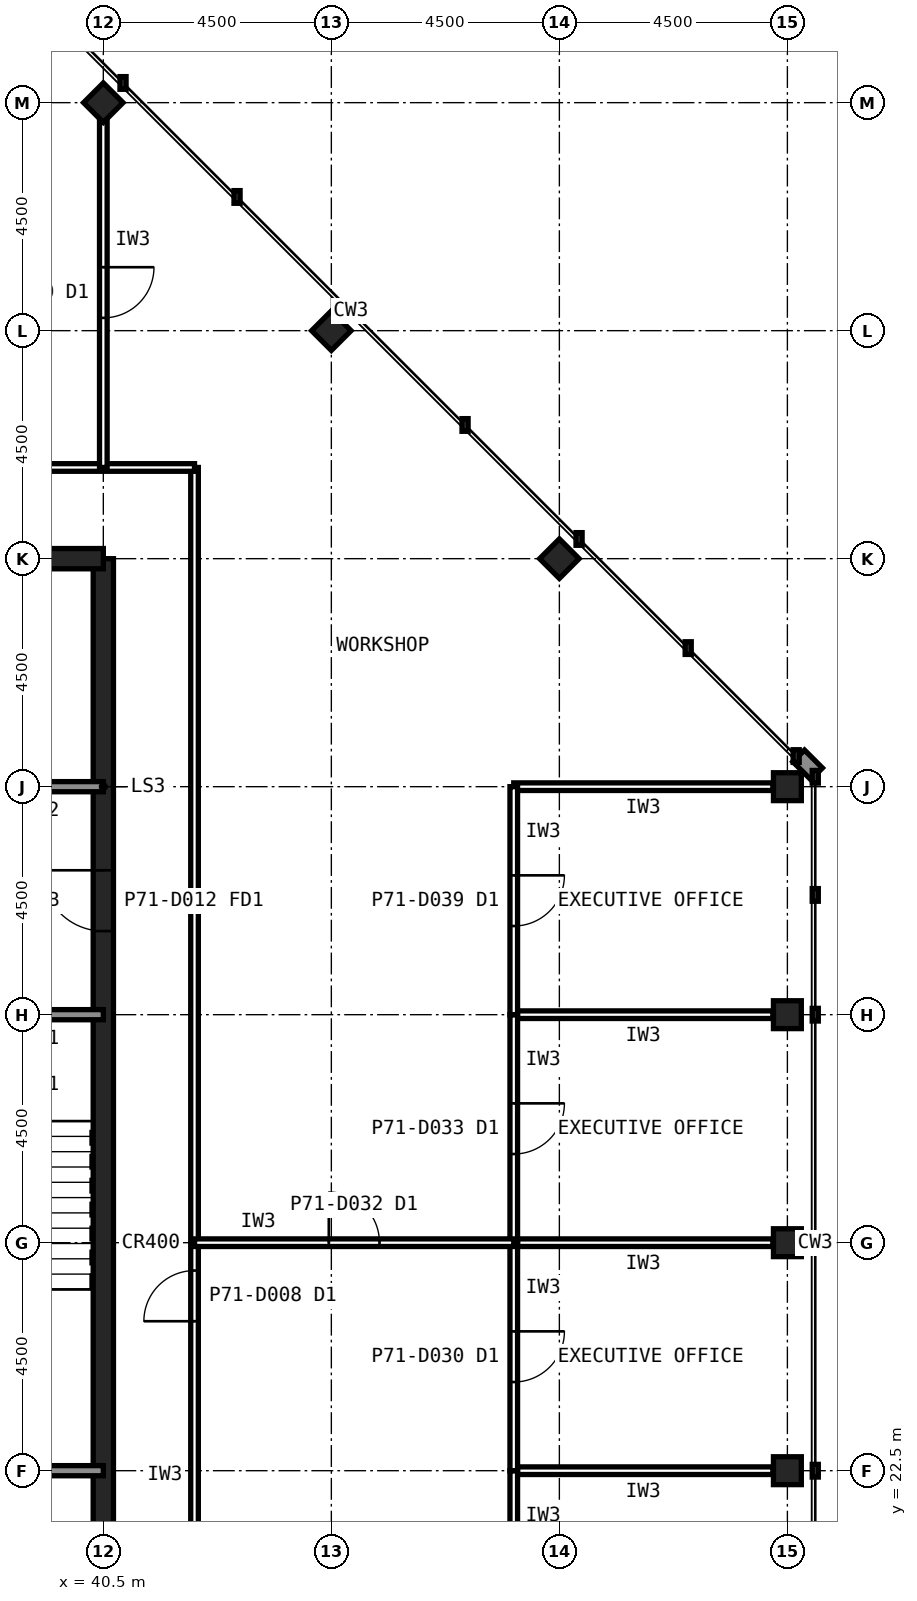
"""IFC4 building model, lengths in metres.
Left out: names, types, materials, properties, quantities, classifications, styles, units other than length and angle.
Written with IfcOpenShell. Run it as: python <this file> out.ifc"""

import sys

from ifc_helpers import new_model, si_unit, direction, frame, frame_2d, origin, origin_2d, place, context, subcontext, project, spatial, rectangle, hollow_rectangle, extrude, element, fill, save


model = new_model("IFC4")
c1 = context("Model", 3, precision=1e-05, world=origin(), true_north=direction((0.0, 1.0)))
c2 = subcontext(c1, "Body", "Model", "MODEL_VIEW")
j1 = project(units=[si_unit("LENGTHUNIT", "METRE"), si_unit("PLANEANGLEUNIT", "RADIAN")], contexts=[c1])
p1 = place(None, origin())
s1 = spatial("IfcSite", under=j1, at=p1, CompositionType="ELEMENT")
p2 = place(p1, origin())
s2 = spatial("IfcBuilding", under=s1, at=p2, CompositionType="ELEMENT")
p3 = place(p2, frame((0.0, 0.0, 294.6)))
s3 = spatial("IfcBuildingStorey", under=s2, at=p3, CompositionType="ELEMENT", Elevation=294.6)
for number, where, z_axis, x_axis in (
    (1, (54.0, 22.5, 0.0), (0.0, 0.0, 1.0), (1.0, 0.0, 0.0)),
    (2, (54.0, 27.0, 0.0), (0.0, 0.0, 1.0), (1.0, 0.0, 0.0)),
    (3, (54.0, 31.5, 0.0), (0.0, 0.0, 1.0), (1.0, 0.0, 0.0)),
    (4, (54.0, 36.0, 0.0), (0.0, 0.0, 1.0), (1.0, 0.0, 0.0)),
    (5, (49.5, 40.5, 0.0), (0.0, 0.0, 1.0), (0.707, 0.707, 0.0)),
    (6, (45.0, 45.0, 0.0), (0.0, 0.0, 1.0), (0.707, 0.707, 0.0)),
    (7, (40.5, 49.5, 0.0), (0.0, 0.0, 1.0), (0.707, 0.707, 0.0)),
):
    element("IfcColumn", number, at=place(p3, frame(where, z_axis=z_axis, x_axis=x_axis)), inside=s3, PredefinedType="COLUMN", context=c2, shape_type="SweptSolid", body=[
        extrude(hollow_rectangle(XDim=0.55, YDim=0.55, WallThickness=0.025, at=origin_2d()), origin(), (0.0, 0.0, 1.0), 4.0),
    ])
p4 = place(p3, frame((40.5, 13.5, 0.0), z_axis=(0.0, 0.0, 1.0), x_axis=(0.0, 1.0, 0.0)))
e8 = element("IfcWall", 8, at=p4, inside=s3, PredefinedType="SHEAR", context=c2, shape_type="SweptSolid", body=[
    extrude(rectangle(XDim=27.0, YDim=0.4, at=frame_2d((13.5, 0.0))), origin(), (0.0, 0.0, 1.0), 4.0),
])
p5 = place(p4, frame((5.85, 0.0, 0.0)))
e9 = element("IfcOpeningElement", 9, at=p5, cuts=e8, PredefinedType="OPENING", context=c2, shape_type="SweptSolid", body=[
    extrude(rectangle(XDim=1.8, YDim=2.1, at=frame_2d((0.9, 1.05))), frame((0.0, 0.21, 0.0), z_axis=(0.0, -1.0, 0.0), x_axis=(1.0, 0.0, 0.0)), (0.0, 0.0, 1.0), 0.42),
])
p6 = place(p4, frame((19.65, 0.0, 0.0)))
e10 = element("IfcOpeningElement", 10, at=p6, cuts=e8, PredefinedType="OPENING", context=c2, shape_type="SweptSolid", body=[
    extrude(rectangle(XDim=1.2, YDim=2.1, at=frame_2d((0.6, 1.05))), frame((0.0, 0.21, 0.0), z_axis=(0.0, -1.0, 0.0), x_axis=(1.0, 0.0, 0.0)), (0.0, 0.0, 1.0), 0.42),
])
p7 = place(p3, frame((40.5, 40.5, 0.0), z_axis=(0.0, 0.0, 1.0), x_axis=(-1.0, 0.0, 0.0)))
e11 = element("IfcWall", 11, at=p7, inside=s3, PredefinedType="SHEAR", context=c2, shape_type="SweptSolid", body=[
    extrude(rectangle(XDim=27.0, YDim=0.4, at=frame_2d((13.5, 0.0))), origin(), (0.0, 0.0, 1.0), 4.0),
])
p8 = place(p3, frame((13.5, 36.0, 0.0), z_axis=(0.0, 0.0, 1.0), x_axis=(1.0, 0.0, 0.0)))
e12 = element("IfcWall", 12, at=p8, inside=s3, PredefinedType="SOLIDWALL", context=c2, shape_type="SweptSolid", body=[
    extrude(rectangle(XDim=27.0, YDim=0.2, at=frame_2d((13.5, 0.0))), origin(), (0.0, 0.0, 1.0), 3.84),
])
p9 = place(p8, frame((1.8, 0.0, 0.0)))
e13 = element("IfcOpeningElement", 13, at=p9, cuts=e12, PredefinedType="OPENING", context=c2, shape_type="SweptSolid", body=[
    extrude(rectangle(XDim=0.9, YDim=2.1, at=frame_2d((0.45, 1.05))), frame((0.0, 0.11, 0.0), z_axis=(0.0, -1.0, 0.0), x_axis=(1.0, 0.0, 0.0)), (0.0, 0.0, 1.0), 0.22),
])
p10 = place(p8, frame((5.55, 0.0, 0.0)))
e14 = element("IfcOpeningElement", 14, at=p10, cuts=e12, PredefinedType="OPENING", context=c2, shape_type="SweptSolid", body=[
    extrude(rectangle(XDim=0.9, YDim=2.1, at=frame_2d((0.45, 1.05))), frame((0.0, 0.11, 0.0), z_axis=(0.0, -1.0, 0.0), x_axis=(1.0, 0.0, 0.0)), (0.0, 0.0, 1.0), 0.22),
])
p11 = place(p8, frame((11.55, 0.0, 0.0)))
e15 = element("IfcOpeningElement", 15, at=p11, cuts=e12, PredefinedType="OPENING", context=c2, shape_type="SweptSolid", body=[
    extrude(rectangle(XDim=0.9, YDim=2.1, at=frame_2d((0.45, 1.05))), frame((0.0, 0.11, 0.0), z_axis=(0.0, -1.0, 0.0), x_axis=(1.0, 0.0, 0.0)), (0.0, 0.0, 1.0), 0.22),
])
p12 = place(p8, frame((14.55, 0.0, 0.0)))
e16 = element("IfcOpeningElement", 16, at=p12, cuts=e12, PredefinedType="OPENING", context=c2, shape_type="SweptSolid", body=[
    extrude(rectangle(XDim=0.9, YDim=2.1, at=frame_2d((0.45, 1.05))), frame((0.0, 0.11, 0.0), z_axis=(0.0, -1.0, 0.0), x_axis=(1.0, 0.0, 0.0)), (0.0, 0.0, 1.0), 0.22),
])
p13 = place(p8, frame((24.1, 0.0, 0.0)))
e17 = element("IfcOpeningElement", 17, at=p13, cuts=e12, PredefinedType="OPENING", context=c2, shape_type="SweptSolid", body=[
    extrude(rectangle(XDim=1.3, YDim=2.2, at=frame_2d((0.65, 1.1))), frame((0.0, 0.11, 0.0), z_axis=(0.0, -1.0, 0.0), x_axis=(1.0, 0.0, 0.0)), (0.0, 0.0, 1.0), 0.22),
])
p14 = place(p3, frame((13.5, 22.5, 0.0), z_axis=(0.0, 0.0, 1.0), x_axis=(1.0, 0.0, 0.0)))
e18 = element("IfcWall", 18, at=p14, inside=s3, PredefinedType="SOLIDWALL", context=c2, shape_type="SweptSolid", body=[
    extrude(rectangle(XDim=27.0, YDim=0.2, at=frame_2d((13.5, 0.0))), origin(), (0.0, 0.0, 1.0), 3.84),
])
p15 = place(p14, frame((1.65, 0.0, 0.0)))
e19 = element("IfcOpeningElement", 19, at=p15, cuts=e18, PredefinedType="OPENING", context=c2, shape_type="SweptSolid", body=[
    extrude(rectangle(XDim=1.2, YDim=2.1, at=frame_2d((0.6, 1.05))), frame((0.0, 0.11, 0.0), z_axis=(0.0, -1.0, 0.0), x_axis=(1.0, 0.0, 0.0)), (0.0, 0.0, 1.0), 0.22),
])
p16 = place(p14, frame((6.025, 0.0, 0.0)))
e20 = element("IfcOpeningElement", 20, at=p16, cuts=e18, PredefinedType="OPENING", context=c2, shape_type="SweptSolid", body=[
    extrude(rectangle(XDim=1.0, YDim=2.1, at=frame_2d((0.5, 1.05))), frame((0.0, 0.11, 0.0), z_axis=(0.0, -1.0, 0.0), x_axis=(1.0, 0.0, 0.0)), (0.0, 0.0, 1.0), 0.22),
])
p17 = place(p14, frame((10.525, 0.0, 0.0)))
e21 = element("IfcOpeningElement", 21, at=p17, cuts=e18, PredefinedType="OPENING", context=c2, shape_type="SweptSolid", body=[
    extrude(rectangle(XDim=1.0, YDim=2.1, at=frame_2d((0.5, 1.05))), frame((0.0, 0.11, 0.0), z_axis=(0.0, -1.0, 0.0), x_axis=(1.0, 0.0, 0.0)), (0.0, 0.0, 1.0), 0.22),
])
p18 = place(p14, frame((19.75, 0.0, 0.0)))
e22 = element("IfcOpeningElement", 22, at=p18, cuts=e18, PredefinedType="OPENING", context=c2, shape_type="SweptSolid", body=[
    extrude(rectangle(XDim=1.0, YDim=2.1, at=frame_2d((0.5, 1.05))), frame((0.0, 0.11, 0.0), z_axis=(0.0, -1.0, 0.0), x_axis=(1.0, 0.0, 0.0)), (0.0, 0.0, 1.0), 0.22),
])
p19 = place(p14, frame((15.05, 0.0, 0.0)))
e23 = element("IfcOpeningElement", 23, at=p19, cuts=e18, PredefinedType="OPENING", context=c2, shape_type="SweptSolid", body=[
    extrude(rectangle(XDim=1.4, YDim=2.4, at=frame_2d((0.7, 1.2))), frame((0.0, 0.11, 0.0), z_axis=(0.0, -1.0, 0.0), x_axis=(1.0, 0.0, 0.0)), (0.0, 0.0, 1.0), 0.22),
])
p20 = place(p3, frame((13.5, 31.5, 0.0), z_axis=(0.0, 0.0, 1.0), x_axis=(1.0, 0.0, 0.0)))
e24 = element("IfcWall", 24, at=p20, inside=s3, PredefinedType="SOLIDWALL", context=c2, shape_type="SweptSolid", body=[
    extrude(rectangle(XDim=27.0, YDim=0.2, at=frame_2d((13.5, 0.0))), origin(), (0.0, 0.0, 1.0), 3.84),
])
p21 = place(p20, frame((24.15, 0.0, 0.0)))
e25 = element("IfcOpeningElement", 25, at=p21, cuts=e24, PredefinedType="OPENING", context=c2, shape_type="SweptSolid", body=[
    extrude(rectangle(XDim=1.2, YDim=2.1, at=frame_2d((0.6, 1.05))), frame((0.0, 0.11, 0.0), z_axis=(0.0, -1.0, 0.0), x_axis=(1.0, 0.0, 0.0)), (0.0, 0.0, 1.0), 0.22),
])
p22 = place(p20, frame((15.3, 0.0, 0.0)))
e26 = element("IfcOpeningElement", 26, at=p22, cuts=e24, PredefinedType="OPENING", context=c2, shape_type="SweptSolid", body=[
    extrude(rectangle(XDim=0.9, YDim=2.1, at=frame_2d((0.45, 1.05))), frame((0.0, 0.11, 0.0), z_axis=(0.0, -1.0, 0.0), x_axis=(1.0, 0.0, 0.0)), (0.0, 0.0, 1.0), 0.22),
])
p23 = place(p20, frame((19.8, 0.0, 0.0)))
e27 = element("IfcOpeningElement", 27, at=p23, cuts=e24, PredefinedType="OPENING", context=c2, shape_type="SweptSolid", body=[
    extrude(rectangle(XDim=0.9, YDim=2.1, at=frame_2d((0.45, 1.05))), frame((0.0, 0.11, 0.0), z_axis=(0.0, -1.0, 0.0), x_axis=(1.0, 0.0, 0.0)), (0.0, 0.0, 1.0), 0.22),
])
p24 = place(p3, frame((42.3, 11.7, 0.0), z_axis=(0.0, 0.0, 1.0), x_axis=(0.0, 1.0, 0.0)))
e28 = element("IfcWall", 28, at=p24, inside=s3, PredefinedType="PARTITIONING", context=c2, shape_type="SweptSolid", body=[
    extrude(rectangle(XDim=30.6, YDim=0.15, at=frame_2d((15.3, 0.0))), origin(), (0.0, 0.0, 1.0), 3.84),
])
p25 = place(p24, frame((13.75, 0.0, 0.0)))
e29 = element("IfcOpeningElement", 29, at=p25, cuts=e28, PredefinedType="OPENING", context=c2, shape_type="SweptSolid", body=[
    extrude(rectangle(XDim=1.0, YDim=2.1, at=frame_2d((0.5, 1.05))), frame((0.0, 0.085, 0.0), z_axis=(0.0, -1.0, 0.0), x_axis=(1.0, 0.0, 0.0)), (0.0, 0.0, 1.0), 0.17),
])
p26 = place(p3, frame((42.3, 42.3, 0.0), z_axis=(0.0, 0.0, 1.0), x_axis=(-1.0, 0.0, 0.0)))
e30 = element("IfcWall", 30, at=p26, inside=s3, PredefinedType="PARTITIONING", context=c2, shape_type="SweptSolid", body=[
    extrude(rectangle(XDim=30.6, YDim=0.15, at=frame_2d((15.3, 0.0))), origin(), (0.0, 0.0, 1.0), 3.84),
])
p27 = place(p26, frame((14.8, 0.0, 0.0)))
e31 = element("IfcOpeningElement", 31, at=p27, cuts=e30, PredefinedType="OPENING", context=c2, shape_type="SweptSolid", body=[
    extrude(rectangle(XDim=1.0, YDim=2.1, at=frame_2d((0.5, 1.05))), frame((0.0, 0.085, 0.0), z_axis=(0.0, -1.0, 0.0), x_axis=(1.0, 0.0, 0.0)), (0.0, 0.0, 1.0), 0.17),
])
p28 = place(p3, frame((53.715, 22.5, 0.0), z_axis=(0.0, 0.0, 1.0), x_axis=(-1.0, 0.0, 0.0)))
e32 = element("IfcWall", 32, at=p28, inside=s3, PredefinedType="PARTITIONING", context=c2, shape_type="SweptSolid", body=[
    extrude(rectangle(XDim=5.115, YDim=0.15, at=frame_2d((2.558, 0.0))), origin(), (0.0, 0.0, 1.0), 2.989),
])
p29 = place(p3, frame((48.6, 22.5, 0.0), z_axis=(0.0, 0.0, 1.0), x_axis=(0.0, -1.0, 0.0)))
e33 = element("IfcWall", 33, at=p29, inside=s3, PredefinedType="PARTITIONING", context=c2, shape_type="SweptSolid", body=[
    extrude(rectangle(XDim=4.5, YDim=0.15, at=frame_2d((2.25, 0.0))), origin(), (0.0, 0.0, 1.0), 3.84),
])
p30 = place(p29, frame((1.75, 0.0, 0.0)))
e34 = element("IfcOpeningElement", 34, at=p30, cuts=e33, PredefinedType="OPENING", context=c2, shape_type="SweptSolid", body=[
    extrude(rectangle(XDim=1.0, YDim=2.1, at=frame_2d((0.5, 1.05))), frame((0.0, 0.085, 0.0), z_axis=(0.0, -1.0, 0.0), x_axis=(1.0, 0.0, 0.0)), (0.0, 0.0, 1.0), 0.17),
])
p31 = place(p3, frame((53.715, 27.0, 0.0), z_axis=(0.0, 0.0, 1.0), x_axis=(-1.0, 0.0, 0.0)))
e35 = element("IfcWall", 35, at=p31, inside=s3, PredefinedType="PARTITIONING", context=c2, shape_type="SweptSolid", body=[
    extrude(rectangle(XDim=5.115, YDim=0.15, at=frame_2d((2.558, 0.0))), origin(), (0.0, 0.0, 1.0), 2.989),
])
p32 = place(p3, frame((48.6, 27.0, 0.0), z_axis=(0.0, 0.0, 1.0), x_axis=(0.0, -1.0, 0.0)))
e36 = element("IfcWall", 36, at=p32, inside=s3, PredefinedType="PARTITIONING", context=c2, shape_type="SweptSolid", body=[
    extrude(rectangle(XDim=4.5, YDim=0.15, at=frame_2d((2.25, 0.0))), origin(), (0.0, 0.0, 1.0), 3.84),
])
p33 = place(p32, frame((1.75, 0.0, 0.0)))
e37 = element("IfcOpeningElement", 37, at=p33, cuts=e36, PredefinedType="OPENING", context=c2, shape_type="SweptSolid", body=[
    extrude(rectangle(XDim=1.0, YDim=2.1, at=frame_2d((0.5, 1.05))), frame((0.0, 0.085, 0.0), z_axis=(0.0, -1.0, 0.0), x_axis=(1.0, 0.0, 0.0)), (0.0, 0.0, 1.0), 0.17),
])
p34 = place(p3, frame((53.715, 31.5, 0.0), z_axis=(0.0, 0.0, 1.0), x_axis=(-1.0, 0.0, 0.0)))
e38 = element("IfcWall", 38, at=p34, inside=s3, PredefinedType="PARTITIONING", context=c2, shape_type="SweptSolid", body=[
    extrude(rectangle(XDim=5.115, YDim=0.15, at=frame_2d((2.558, 0.0))), origin(), (0.0, 0.0, 1.0), 2.989),
])
p35 = place(p3, frame((48.6, 31.5, 0.0), z_axis=(0.0, 0.0, 1.0), x_axis=(0.0, -1.0, 0.0)))
e39 = element("IfcWall", 39, at=p35, inside=s3, PredefinedType="PARTITIONING", context=c2, shape_type="SweptSolid", body=[
    extrude(rectangle(XDim=4.5, YDim=0.15, at=frame_2d((2.25, 0.0))), origin(), (0.0, 0.0, 1.0), 3.84),
])
p36 = place(p35, frame((1.75, 0.0, 0.0)))
e40 = element("IfcOpeningElement", 40, at=p36, cuts=e39, PredefinedType="OPENING", context=c2, shape_type="SweptSolid", body=[
    extrude(rectangle(XDim=1.0, YDim=2.1, at=frame_2d((0.5, 1.05))), frame((0.0, 0.085, 0.0), z_axis=(0.0, -1.0, 0.0), x_axis=(1.0, 0.0, 0.0)), (0.0, 0.0, 1.0), 0.17),
])
p37 = place(p3, frame((53.715, 36.0, 0.0), z_axis=(0.0, 0.0, 1.0), x_axis=(-1.0, 0.0, 0.0)))
e41 = element("IfcWall", 41, at=p37, inside=s3, PredefinedType="PARTITIONING", context=c2, shape_type="SweptSolid", body=[
    extrude(rectangle(XDim=5.115, YDim=0.15, at=frame_2d((2.558, 0.0))), origin(), (0.0, 0.0, 1.0), 2.989),
])
p38 = place(p3, frame((48.6, 36.0, 0.0), z_axis=(0.0, 0.0, 1.0), x_axis=(0.0, -1.0, 0.0)))
e42 = element("IfcWall", 42, at=p38, inside=s3, PredefinedType="PARTITIONING", context=c2, shape_type="SweptSolid", body=[
    extrude(rectangle(XDim=4.5, YDim=0.15, at=frame_2d((2.25, 0.0))), origin(), (0.0, 0.0, 1.0), 3.84),
])
p39 = place(p38, frame((1.75, 0.0, 0.0)))
e43 = element("IfcOpeningElement", 43, at=p39, cuts=e42, PredefinedType="OPENING", context=c2, shape_type="SweptSolid", body=[
    extrude(rectangle(XDim=1.0, YDim=2.1, at=frame_2d((0.5, 1.05))), frame((0.0, 0.085, 0.0), z_axis=(0.0, -1.0, 0.0), x_axis=(1.0, 0.0, 0.0)), (0.0, 0.0, 1.0), 0.17),
])
p40 = place(p3, frame((40.5, 49.205, 0.0), z_axis=(0.0, 0.0, 1.0), x_axis=(0.0, -1.0, 0.0)))
e44 = element("IfcWall", 44, at=p40, inside=s3, PredefinedType="PARTITIONING", context=c2, shape_type="SweptSolid", body=[
    extrude(rectangle(XDim=6.905, YDim=0.15, at=frame_2d((3.453, 0.0))), origin(), (0.0, 0.0, 1.0), 2.989),
])
p41 = place(p40, frame((2.952, 0.0, 0.0)))
e45 = element("IfcOpeningElement", 45, at=p41, cuts=e44, PredefinedType="OPENING", context=c2, shape_type="SweptSolid", body=[
    extrude(rectangle(XDim=1.0, YDim=2.1, at=frame_2d((0.5, 1.05))), frame((0.0, 0.085, 0.0), z_axis=(0.0, -1.0, 0.0), x_axis=(1.0, 0.0, 0.0)), (0.0, 0.0, 1.0), 0.17),
])
p42 = place(p3, frame((42.3, 27.0, 0.0), z_axis=(0.0, 0.0, 1.0), x_axis=(1.0, 0.0, 0.0)))
e46 = element("IfcWall", 46, at=p42, inside=s3, PredefinedType="PARTITIONING", context=c2, shape_type="SweptSolid", body=[
    extrude(rectangle(XDim=6.3, YDim=0.15, at=frame_2d((3.15, 0.0))), origin(), (0.0, 0.0, 1.0), 2.989),
])
p43 = place(p42, frame((2.65, 0.0, 0.0)))
e47 = element("IfcOpeningElement", 47, at=p43, cuts=e46, PredefinedType="OPENING", context=c2, shape_type="SweptSolid", body=[
    extrude(rectangle(XDim=1.0, YDim=2.1, at=frame_2d((0.5, 1.05))), frame((0.0, 0.085, 0.0), z_axis=(0.0, -1.0, 0.0), x_axis=(1.0, 0.0, 0.0)), (0.0, 0.0, 1.0), 0.17),
])
p44 = place(p6, origin())
e48 = element("IfcDoor", 48, at=p44, inside=s3, OperationType="SINGLE_SWING_RIGHT", PredefinedType="DOOR", context=c2, shape_type="SweptSolid", body=[
    extrude(rectangle(XDim=1.2, YDim=2.1, at=frame_2d((0.6, 1.05))), frame((0.0, 0.025, 0.0), z_axis=(0.0, -1.0, 0.0), x_axis=(1.0, 0.0, 0.0)), (0.0, 0.0, 1.0), 0.05),
])
fill(e10, e48)
p45 = place(p25, origin())
e49 = element("IfcDoor", 49, at=p45, inside=s3, OperationType="SINGLE_SWING_LEFT", PredefinedType="DOOR", context=c2, shape_type="SweptSolid", body=[
    extrude(rectangle(XDim=1.0, YDim=2.1, at=frame_2d((0.5, 1.05))), frame((0.0, 0.025, 0.0), z_axis=(0.0, -1.0, 0.0), x_axis=(1.0, 0.0, 0.0)), (0.0, 0.0, 1.0), 0.05),
])
fill(e29, e49)
p46 = place(p33, origin())
e50 = element("IfcDoor", 50, at=p46, inside=s3, OperationType="SINGLE_SWING_LEFT", PredefinedType="DOOR", context=c2, shape_type="SweptSolid", body=[
    extrude(rectangle(XDim=1.0, YDim=2.1, at=frame_2d((0.5, 1.05))), frame((0.0, 0.025, 0.0), z_axis=(0.0, -1.0, 0.0), x_axis=(1.0, 0.0, 0.0)), (0.0, 0.0, 1.0), 0.05),
])
fill(e37, e50)
p47 = place(p36, origin())
e51 = element("IfcDoor", 51, at=p47, inside=s3, OperationType="SINGLE_SWING_LEFT", PredefinedType="DOOR", context=c2, shape_type="SweptSolid", body=[
    extrude(rectangle(XDim=1.0, YDim=2.1, at=frame_2d((0.5, 1.05))), frame((0.0, 0.025, 0.0), z_axis=(0.0, -1.0, 0.0), x_axis=(1.0, 0.0, 0.0)), (0.0, 0.0, 1.0), 0.05),
])
fill(e40, e51)
p48 = place(p39, origin())
e52 = element("IfcDoor", 52, at=p48, inside=s3, OperationType="SINGLE_SWING_LEFT", PredefinedType="DOOR", context=c2, shape_type="SweptSolid", body=[
    extrude(rectangle(XDim=1.0, YDim=2.1, at=frame_2d((0.5, 1.05))), frame((0.0, 0.025, 0.0), z_axis=(0.0, -1.0, 0.0), x_axis=(1.0, 0.0, 0.0)), (0.0, 0.0, 1.0), 0.05),
])
fill(e43, e52)
p49 = place(p41, origin())
e53 = element("IfcDoor", 53, at=p49, inside=s3, OperationType="SINGLE_SWING_LEFT", PredefinedType="DOOR", context=c2, shape_type="SweptSolid", body=[
    extrude(rectangle(XDim=1.0, YDim=2.1, at=frame_2d((0.5, 1.05))), frame((0.0, 0.025, 0.0), z_axis=(0.0, -1.0, 0.0), x_axis=(1.0, 0.0, 0.0)), (0.0, 0.0, 1.0), 0.05),
])
fill(e45, e53)
p50 = place(p43, origin())
e54 = element("IfcDoor", 54, at=p50, inside=s3, OperationType="SINGLE_SWING_LEFT", PredefinedType="DOOR", context=c2, shape_type="SweptSolid", body=[
    extrude(rectangle(XDim=1.0, YDim=2.1, at=frame_2d((0.5, 1.05))), frame((0.0, 0.025, 0.0), z_axis=(0.0, -1.0, 0.0), x_axis=(1.0, 0.0, 0.0)), (0.0, 0.0, 1.0), 0.05),
])
fill(e47, e54)
save(model, sys.argv[1])
